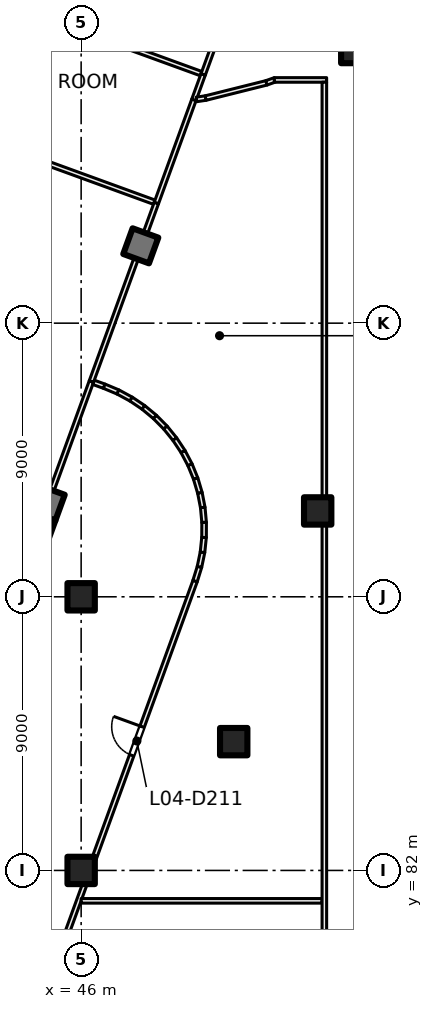
"""IFC4 building model, lengths in metres.
Left out: names, types, materials, properties, quantities, classifications, styles, units other than length and angle.
Written with IfcOpenShell. Run it as: python <this file> out.ifc"""

import sys

from ifc_helpers import new_model, si_unit, direction, frame, frame_2d, origin, origin_2d, place, context, subcontext, project, spatial, rectangle, extrude, element, fill, save


model = new_model("IFC4")
c1 = context("Model", 3, precision=1e-05, world=origin(), true_north=direction((0.0, 1.0)))
c2 = subcontext(c1, "Body", "Model", "MODEL_VIEW")
j1 = project(units=[si_unit("LENGTHUNIT", "METRE"), si_unit("PLANEANGLEUNIT", "RADIAN")], contexts=[c1])
p1 = place(None, origin())
s1 = spatial("IfcSite", under=j1, at=p1, CompositionType="ELEMENT")
p2 = place(p1, origin())
s2 = spatial("IfcBuilding", under=s1, at=p2, CompositionType="ELEMENT")
p3 = place(p2, frame((0.0, 0.0, 22.5)))
s3 = spatial("IfcBuildingStorey", under=s2, at=p3, CompositionType="ELEMENT", Elevation=22.5)
for number, where, z_axis, x_axis in (
    (1, (46.0, 82.0, 0.0), (0.0, 0.0, 1.0), (1.0, 0.0, 0.0)),
    (2, (46.0, 91.0, 0.0), (0.0, 0.0, 1.0), (1.0, 0.0, 0.0)),
    (3, (55.0, 109.0, 0.0), (0.0, 0.0, 1.0), (1.0, 0.0, 0.0)),
    (4, (51.019, 86.236, 0.0), (0.0, 0.0, 1.0), (1.0, 0.0, 0.0)),
    (5, (53.78, 93.824, 0.0), (0.0, 0.0, 1.0), (1.0, 0.0, 0.0)),
    (6, (47.962, 102.544, 0.0), (0.0, 0.0, 1.0), (-0.342, -0.94, 0.0)),
    (7, (44.884, 94.087, 0.0), (0.0, 0.0, 1.0), (-0.342, -0.94, 0.0)),
):
    element("IfcColumn", number, at=place(p3, frame(where, z_axis=z_axis, x_axis=x_axis)), inside=s3, PredefinedType="COLUMN", context=c2, shape_type="SweptSolid", body=[
        extrude(rectangle(XDim=0.9, YDim=0.9, at=origin_2d()), origin(), (0.0, 0.0, 1.0), 5.0),
    ])
p4 = place(p3, frame((41.827, 85.249, 0.0), z_axis=(0.0, 0.0, 1.0), x_axis=(0.342016162452, 0.939694069696, 0.0)))
e8 = element("IfcWall", 8, at=p4, inside=s3, PredefinedType="SHEAR", context=c2, shape_type="SweptSolid", body=[
    extrude(rectangle(XDim=8.9, YDim=0.6, at=frame_2d((4.45, 0.0))), origin(), (0.0, 0.0, 1.0), 5.0),
])
p5 = place(p3, frame((110.368, 100.798, 0.0), z_axis=(0.0, 0.0, 1.0), x_axis=(-0.866702553925, -0.498825303107, 0.0)))
e9 = element("IfcWall", 9, at=p5, inside=s3, PredefinedType="SOLIDWALL", context=c2, shape_type="SweptSolid", body=[
    extrude(rectangle(XDim=66.651, YDim=0.6, at=frame_2d((33.325, 0.0))), origin(), (0.0, 0.0, 1.0), 4.625),
])
p6 = place(p5, frame((0.794, 0.0, 0.9)))
e10 = element("IfcOpeningElement", 10, at=p6, cuts=e9, PredefinedType="OPENING", context=c2, shape_type="SweptSolid", body=[
    extrude(rectangle(XDim=3.0, YDim=3.0, at=frame_2d((1.5, 1.5))), frame((0.0, 0.31, 0.0), z_axis=(0.0, -1.0, 0.0), x_axis=(1.0, 0.0, 0.0)), (0.0, 0.0, 1.0), 0.62),
])
p7 = place(p5, frame((9.542, 0.0, 0.9)))
e11 = element("IfcOpeningElement", 11, at=p7, cuts=e9, PredefinedType="OPENING", context=c2, shape_type="SweptSolid", body=[
    extrude(rectangle(XDim=3.0, YDim=3.0, at=frame_2d((1.5, 1.5))), frame((0.0, 0.31, 0.0), z_axis=(0.0, -1.0, 0.0), x_axis=(1.0, 0.0, 0.0)), (0.0, 0.0, 1.0), 0.62),
])
p8 = place(p5, frame((18.439, 0.0, 0.9)))
e12 = element("IfcOpeningElement", 12, at=p8, cuts=e9, PredefinedType="OPENING", context=c2, shape_type="SweptSolid", body=[
    extrude(rectangle(XDim=3.0, YDim=3.0, at=frame_2d((1.5, 1.5))), frame((0.0, 0.31, 0.0), z_axis=(0.0, -1.0, 0.0), x_axis=(1.0, 0.0, 0.0)), (0.0, 0.0, 1.0), 0.62),
])
p9 = place(p5, frame((27.337, 0.0, 0.9)))
e13 = element("IfcOpeningElement", 13, at=p9, cuts=e9, PredefinedType="OPENING", context=c2, shape_type="SweptSolid", body=[
    extrude(rectangle(XDim=3.0, YDim=3.0, at=frame_2d((1.5, 1.5))), frame((0.0, 0.31, 0.0), z_axis=(0.0, -1.0, 0.0), x_axis=(1.0, 0.0, 0.0)), (0.0, 0.0, 1.0), 0.62),
])
p10 = place(p5, frame((36.234, 0.0, 0.9)))
e14 = element("IfcOpeningElement", 14, at=p10, cuts=e9, PredefinedType="OPENING", context=c2, shape_type="SweptSolid", body=[
    extrude(rectangle(XDim=3.0, YDim=3.0, at=frame_2d((1.5, 1.5))), frame((0.0, 0.31, 0.0), z_axis=(0.0, -1.0, 0.0), x_axis=(1.0, 0.0, 0.0)), (0.0, 0.0, 1.0), 0.62),
])
p11 = place(p5, frame((45.131, 0.0, 0.9)))
e15 = element("IfcOpeningElement", 15, at=p11, cuts=e9, PredefinedType="OPENING", context=c2, shape_type="SweptSolid", body=[
    extrude(rectangle(XDim=3.0, YDim=3.0, at=frame_2d((1.5, 1.5))), frame((0.0, 0.31, 0.0), z_axis=(0.0, -1.0, 0.0), x_axis=(1.0, 0.0, 0.0)), (0.0, 0.0, 1.0), 0.62),
])
p12 = place(p5, frame((54.029, 0.0, 0.9)))
e16 = element("IfcOpeningElement", 16, at=p12, cuts=e9, PredefinedType="OPENING", context=c2, shape_type="SweptSolid", body=[
    extrude(rectangle(XDim=3.0, YDim=3.0, at=frame_2d((1.5, 1.5))), frame((0.0, 0.31, 0.0), z_axis=(0.0, -1.0, 0.0), x_axis=(1.0, 0.0, 0.0)), (0.0, 0.0, 1.0), 0.62),
])
p13 = place(p5, frame((63.514, 0.0, 0.9)))
e17 = element("IfcOpeningElement", 17, at=p13, cuts=e9, PredefinedType="OPENING", context=c2, shape_type="SweptSolid", body=[
    extrude(rectangle(XDim=1.2, YDim=3.0, at=frame_2d((0.6, 1.5))), frame((0.0, 0.31, 0.0), z_axis=(0.0, -1.0, 0.0), x_axis=(1.0, 0.0, 0.0)), (0.0, 0.0, 1.0), 0.62),
])
p14 = place(p3, frame((40.44, 106.878, 0.0), z_axis=(0.0, 0.0, 1.0), x_axis=(0.939697516706, -0.342006691597, 0.0)))
e18 = element("IfcWall", 18, at=p14, inside=s3, PredefinedType="PARTITIONING", context=c2, shape_type="SweptSolid", body=[
    extrude(rectangle(XDim=8.476, YDim=0.15, at=frame_2d((4.238, 0.0))), origin(), (0.0, 0.0, 1.0), 4.625),
])
p15 = place(p3, frame((42.074, 111.072, 0.0), z_axis=(0.0, 0.0, 1.0), x_axis=(0.939710837098, -0.341970090272, 0.0)))
e19 = element("IfcWall", 19, at=p15, inside=s3, PredefinedType="PARTITIONING", context=c2, shape_type="SweptSolid", body=[
    extrude(rectangle(XDim=8.375, YDim=0.15, at=frame_2d((4.188, 0.0))), origin(), (0.0, 0.0, 1.0), 4.625),
])
p16 = place(p3, frame((49.749, 91.52, 0.0), z_axis=(0.0, 0.0, 1.0), x_axis=(-0.342022021776, -0.939691937084, 0.0)))
e20 = element("IfcWall", 20, at=p16, inside=s3, PredefinedType="PARTITIONING", context=c2, shape_type="SweptSolid", body=[
    extrude(rectangle(XDim=17.004, YDim=0.15, at=frame_2d((8.502, 0.0))), origin(), (0.0, 0.0, 1.0), 4.625),
])
p17 = place(p16, frame((5.101, 0.0, 0.0)))
e21 = element("IfcOpeningElement", 21, at=p17, cuts=e20, PredefinedType="OPENING", context=c2, shape_type="SweptSolid", body=[
    extrude(rectangle(XDim=1.0, YDim=2.1, at=frame_2d((0.5, 1.05))), frame((0.0, 0.085, 0.0), z_axis=(0.0, -1.0, 0.0), x_axis=(1.0, 0.0, 0.0)), (0.0, 0.0, 1.0), 0.17),
])
p18 = place(p3, frame((44.627, 93.382, 0.0), z_axis=(0.0, 0.0, 1.0), x_axis=(0.342025351501, 0.939690725149, 0.0)))
e22 = element("IfcWall", 22, at=p18, inside=s3, PredefinedType="PARTITIONING", context=c2, shape_type="SweptSolid", body=[
    extrude(rectangle(XDim=5.0, YDim=0.15, at=frame_2d((2.5, 0.0))), origin(), (0.0, 0.0, 1.0), 4.625),
])
p19 = place(p3, frame((46.0, 81.0, 0.0), z_axis=(0.0, 0.0, 1.0), x_axis=(1.0, 0.0, 0.0)))
e23 = element("IfcWall", 23, at=p19, inside=s3, PredefinedType="PARTITIONING", context=c2, shape_type="SweptSolid", body=[
    extrude(rectangle(XDim=7.925, YDim=0.15, at=frame_2d((3.962, 0.0))), origin(), (0.0, 0.0, 1.0), 4.625),
])
p20 = place(p3, frame((46.407, 98.054, 0.0), z_axis=(0.0, 0.0, 1.0), x_axis=(0.939944328342, -0.341327789109, 0.0)))
e24 = element("IfcWall", 24, at=p20, inside=s3, PredefinedType="PARTITIONING", context=c2, shape_type="SweptSolid", body=[
    extrude(rectangle(XDim=0.378, YDim=0.15, at=frame_2d((0.189, 0.0))), origin(), (0.0, 0.0, 1.0), 4.625),
])
p21 = place(p3, frame((46.337, 98.08, 0.0), z_axis=(0.0, 0.0, 1.0), x_axis=(0.342113136459, 0.939658768842, 0.0)))
e25 = element("IfcWall", 25, at=p21, inside=s3, PredefinedType="PARTITIONING", context=c2, shape_type="SweptSolid", body=[
    extrude(rectangle(XDim=6.25, YDim=0.15, at=frame_2d((3.125, 0.0))), origin(), (0.0, 0.0, 1.0), 4.625),
])
p22 = place(p3, frame((46.758, 97.927, 0.0), z_axis=(0.0, 0.0, 1.0), x_axis=(0.922024303007, -0.387131999019, 0.0)))
e26 = element("IfcWall", 26, at=p22, inside=s3, PredefinedType="PARTITIONING", context=c2, shape_type="SweptSolid", body=[
    extrude(rectangle(XDim=0.496, YDim=0.15, at=frame_2d((0.248, 0.0))), origin(), (0.0, 0.0, 1.0), 4.625),
])
p23 = place(p3, frame((47.209, 97.738, 0.0), z_axis=(0.0, 0.0, 1.0), x_axis=(0.878624509573, -0.47751332042, 0.0)))
e27 = element("IfcWall", 27, at=p23, inside=s3, PredefinedType="PARTITIONING", context=c2, shape_type="SweptSolid", body=[
    extrude(rectangle(XDim=0.499, YDim=0.15, at=frame_2d((0.249, 0.0))), origin(), (0.0, 0.0, 1.0), 4.625),
])
p24 = place(p3, frame((47.641, 97.504, 0.0), z_axis=(0.0, 0.0, 1.0), x_axis=(0.829013848944, -0.559228073561, 0.0)))
e28 = element("IfcWall", 28, at=p24, inside=s3, PredefinedType="PARTITIONING", context=c2, shape_type="SweptSolid", body=[
    extrude(rectangle(XDim=0.497, YDim=0.15, at=frame_2d((0.249, 0.0))), origin(), (0.0, 0.0, 1.0), 4.625),
])
p25 = place(p3, frame((48.047, 97.23, 0.0), z_axis=(0.0, 0.0, 1.0), x_axis=(0.770145329221, -0.637868459699, 0.0)))
e29 = element("IfcWall", 29, at=p25, inside=s3, PredefinedType="PARTITIONING", context=c2, shape_type="SweptSolid", body=[
    extrude(rectangle(XDim=0.498, YDim=0.15, at=frame_2d((0.249, 0.0))), origin(), (0.0, 0.0, 1.0), 4.625),
])
p26 = place(p3, frame((48.425, 96.917, 0.0), z_axis=(0.0, 0.0, 1.0), x_axis=(0.702936615275, -0.711252497293, 0.0)))
e30 = element("IfcWall", 30, at=p26, inside=s3, PredefinedType="PARTITIONING", context=c2, shape_type="SweptSolid", body=[
    extrude(rectangle(XDim=0.499, YDim=0.15, at=frame_2d((0.25, 0.0))), origin(), (0.0, 0.0, 1.0), 4.625),
])
p27 = place(p3, frame((48.475, 103.953, 0.0), z_axis=(0.0, 0.0, 1.0), x_axis=(0.341992779494, 0.939702579955, 0.0)))
e31 = element("IfcWall", 31, at=p27, inside=s3, PredefinedType="PARTITIONING", context=c2, shape_type="SweptSolid", body=[
    extrude(rectangle(XDim=3.611, YDim=0.15, at=frame_2d((1.805, 0.0))), origin(), (0.0, 0.0, 1.0), 4.625),
])
for number, where, z_axis, x_axis in (
    (32, (48.771, 96.568, 0.0), (0.0, 0.0, 1.0), (0.629, -0.778, 0.0)),
    (33, (49.08, 96.187, 0.0), (0.0, 0.0, 1.0), (0.552, -0.834, 0.0)),
):
    element("IfcWall", number, at=place(p3, frame(where, z_axis=z_axis, x_axis=x_axis)), inside=s3, PredefinedType="PARTITIONING", context=c2, shape_type="SweptSolid", body=[
        extrude(rectangle(XDim=0.498, YDim=0.15, at=frame_2d((0.249, 0.0))), origin(), (0.0, 0.0, 1.0), 4.625),
    ])
p28 = place(p3, frame((49.351, 95.778, 0.0), z_axis=(0.0, 0.0, 1.0), x_axis=(0.46615085347, -0.884705251374, 0.0)))
e34 = element("IfcWall", 34, at=p28, inside=s3, PredefinedType="PARTITIONING", context=c2, shape_type="SweptSolid", body=[
    extrude(rectangle(XDim=0.498, YDim=0.15, at=frame_2d((0.249, 0.0))), origin(), (0.0, 0.0, 1.0), 4.625),
])
p29 = place(p3, frame((49.58, 95.344, 0.0), z_axis=(0.0, 0.0, 1.0), x_axis=(0.378326719955, -0.925672130383, 0.0)))
e35 = element("IfcWall", 35, at=p29, inside=s3, PredefinedType="PARTITIONING", context=c2, shape_type="SweptSolid", body=[
    extrude(rectangle(XDim=0.497, YDim=0.15, at=frame_2d((0.249, 0.0))), origin(), (0.0, 0.0, 1.0), 4.625),
])
p30 = place(p3, frame((49.71, 107.346, 0.0), z_axis=(0.0, 0.0, 1.0), x_axis=(0.341721024877, 0.93980143709, 0.0)))
e36 = element("IfcWall", 36, at=p30, inside=s3, PredefinedType="PARTITIONING", context=c2, shape_type="SweptSolid", body=[
    extrude(rectangle(XDim=0.889, YDim=0.15, at=frame_2d((0.445, 0.0))), origin(), (0.0, 0.0, 1.0), 4.625),
])
p31 = place(p3, frame((49.794, 107.359, 0.0), z_axis=(0.0, 0.0, 1.0), x_axis=(0.988901730308, 0.148571086668, 0.0)))
e37 = element("IfcWall", 37, at=p31, inside=s3, PredefinedType="PARTITIONING", context=c2, shape_type="SweptSolid", body=[
    extrude(rectangle(XDim=0.311, YDim=0.15, at=frame_2d((0.155, 0.0))), origin(), (0.0, 0.0, 1.0), 4.625),
])
p32 = place(p3, frame((49.747, 91.516, 0.0), z_axis=(0.0, 0.0, 1.0), x_axis=(0.296228958727, 0.955116958289, 0.0)))
e38 = element("IfcWall", 38, at=p32, inside=s3, PredefinedType="PARTITIONING", context=c2, shape_type="SweptSolid", body=[
    extrude(rectangle(XDim=0.496, YDim=0.15, at=frame_2d((0.248, 0.0))), origin(), (0.0, 0.0, 1.0), 4.625),
])
p33 = place(p3, frame((49.766, 94.891, 0.0), z_axis=(0.0, 0.0, 1.0), x_axis=(0.283938571221, -0.958842472867, 0.0)))
e39 = element("IfcWall", 39, at=p33, inside=s3, PredefinedType="PARTITIONING", context=c2, shape_type="SweptSolid", body=[
    extrude(rectangle(XDim=0.5, YDim=0.15, at=frame_2d((0.25, 0.0))), origin(), (0.0, 0.0, 1.0), 4.625),
])
p34 = place(p3, frame((49.892, 91.983, 0.0), z_axis=(0.0, 0.0, 1.0), x_axis=(0.202330199798, 0.979317359312, 0.0)))
e40 = element("IfcWall", 40, at=p34, inside=s3, PredefinedType="PARTITIONING", context=c2, shape_type="SweptSolid", body=[
    extrude(rectangle(XDim=0.498, YDim=0.15, at=frame_2d((0.249, 0.0))), origin(), (0.0, 0.0, 1.0), 4.625),
])
p35 = place(p3, frame((49.906, 94.42, 0.0), z_axis=(0.0, 0.0, 1.0), x_axis=(0.190646652196, -0.981658725834, 0.0)))
e41 = element("IfcWall", 41, at=p35, inside=s3, PredefinedType="PARTITIONING", context=c2, shape_type="SweptSolid", body=[
    extrude(rectangle(XDim=0.498, YDim=0.15, at=frame_2d((0.249, 0.0))), origin(), (0.0, 0.0, 1.0), 4.625),
])
p36 = place(p3, frame((49.992, 92.463, 0.0), z_axis=(0.0, 0.0, 1.0), x_axis=(0.102314560958, 0.994752095055, 0.0)))
e42 = element("IfcWall", 42, at=p36, inside=s3, PredefinedType="PARTITIONING", context=c2, shape_type="SweptSolid", body=[
    extrude(rectangle(XDim=0.499, YDim=0.15, at=frame_2d((0.25, 0.0))), origin(), (0.0, 0.0, 1.0), 4.625),
])
p37 = place(p3, frame((50.0, 93.939, 0.0), z_axis=(0.0, 0.0, 1.0), x_axis=(0.090006472106, -0.995941180482, 0.0)))
e43 = element("IfcWall", 43, at=p37, inside=s3, PredefinedType="PARTITIONING", context=c2, shape_type="SweptSolid", body=[
    extrude(rectangle(XDim=0.499, YDim=0.15, at=frame_2d((0.25, 0.0))), origin(), (0.0, 0.0, 1.0), 4.625),
])
p38 = place(p3, frame((50.014, 108.182, 0.0), z_axis=(0.0, 0.0, 1.0), x_axis=(0.342035586721, 0.939686999706, 0.0)))
e44 = element("IfcWall", 44, at=p38, inside=s3, PredefinedType="PARTITIONING", context=c2, shape_type="SweptSolid", body=[
    extrude(rectangle(XDim=9.783, YDim=0.15, at=frame_2d((4.892, 0.0))), origin(), (0.0, 0.0, 1.0), 4.625),
])
p39 = place(p3, frame((50.043, 92.951, 0.0), z_axis=(0.0, 0.0, 1.0), x_axis=(0.003913864348, 0.999992340804, 0.0)))
e45 = element("IfcWall", 45, at=p39, inside=s3, PredefinedType="PARTITIONING", context=c2, shape_type="SweptSolid", body=[
    extrude(rectangle(XDim=0.499, YDim=0.15, at=frame_2d((0.25, 0.0))), origin(), (0.0, 0.0, 1.0), 4.625),
])
p40 = place(p3, frame((50.093, 107.403, 0.0), z_axis=(0.0, 0.0, 1.0), x_axis=(0.970121672102, 0.24261892201, 0.0)))
e46 = element("IfcWall", 46, at=p40, inside=s3, PredefinedType="PARTITIONING", context=c2, shape_type="SweptSolid", body=[
    extrude(rectangle(XDim=2.069, YDim=0.15, at=frame_2d((1.034, 0.0))), origin(), (0.0, 0.0, 1.0), 4.625),
])
p41 = place(p3, frame((52.093, 107.903, 0.0), z_axis=(0.0, 0.0, 1.0), x_axis=(0.941980718737, 0.335666986056, 0.0)))
e47 = element("IfcWall", 47, at=p41, inside=s3, PredefinedType="PARTITIONING", context=c2, shape_type="SweptSolid", body=[
    extrude(rectangle(XDim=0.3, YDim=0.15, at=frame_2d((0.15, 0.0))), origin(), (0.0, 0.0, 1.0), 4.625),
])
p42 = place(p3, frame((52.351, 108.0, 0.0), z_axis=(0.0, 0.0, 1.0), x_axis=(1.0, 0.0, 0.0)))
e48 = element("IfcWall", 48, at=p42, inside=s3, PredefinedType="PARTITIONING", context=c2, shape_type="SweptSolid", body=[
    extrude(rectangle(XDim=1.724, YDim=0.15, at=frame_2d((0.862, 0.0))), origin(), (0.0, 0.0, 1.0), 4.625),
])
p43 = place(p3, frame((54.0, 68.702, 0.0), z_axis=(0.0, 0.0, 1.0), x_axis=(0.0, 1.0, 0.0)))
e49 = element("IfcWall", 49, at=p43, inside=s3, PredefinedType="PARTITIONING", context=c2, shape_type="SweptSolid", body=[
    extrude(rectangle(XDim=39.223, YDim=0.15, at=frame_2d((19.612, 0.0))), origin(), (0.0, 0.0, 1.0), 4.625),
])
p44 = place(p17, origin())
e50 = element("IfcDoor", 50, at=p44, inside=s3, OperationType="SINGLE_SWING_LEFT", PredefinedType="DOOR", context=c2, shape_type="SweptSolid", body=[
    extrude(rectangle(XDim=1.0, YDim=2.1, at=frame_2d((0.5, 1.05))), frame((0.0, 0.025, 0.0), z_axis=(0.0, -1.0, 0.0), x_axis=(1.0, 0.0, 0.0)), (0.0, 0.0, 1.0), 0.05),
])
fill(e21, e50)
save(model, sys.argv[1])
